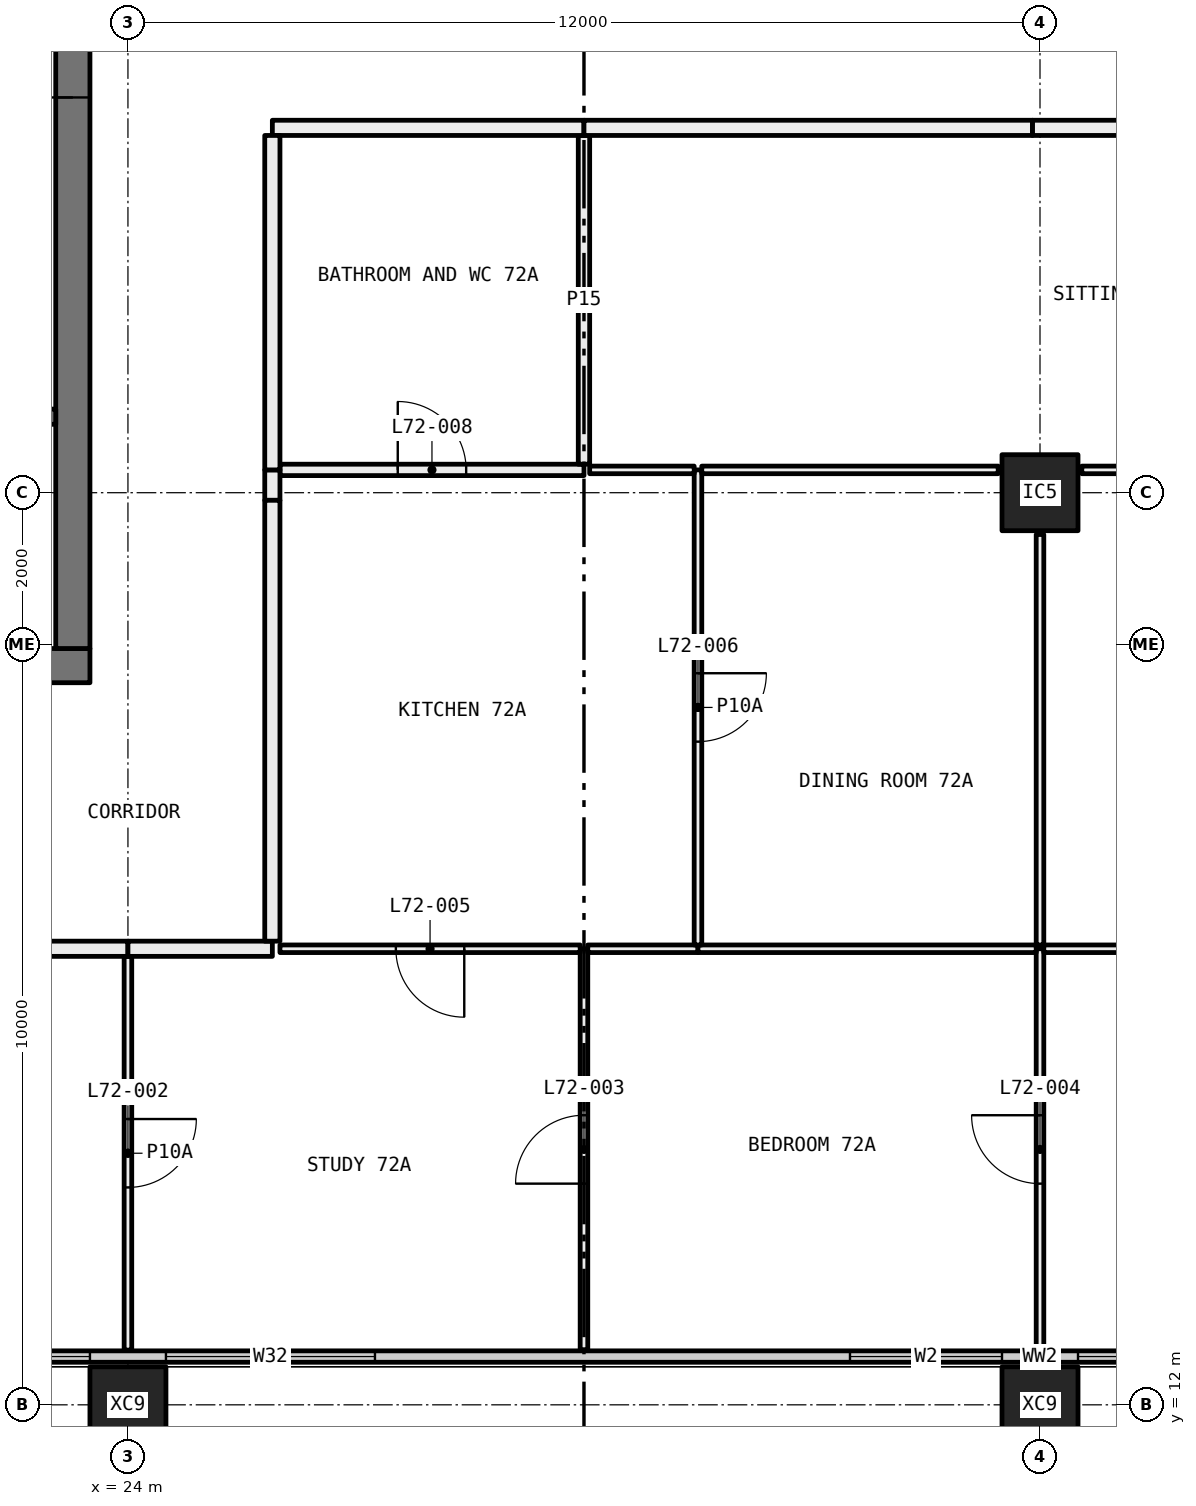
"""IFC4 building model, lengths in metres.
Left out: names, types, materials, properties, quantities, classifications, styles, units other than length and angle.
Written with IfcOpenShell. Run it as: python <this file> out.ifc"""

import sys

from ifc_helpers import new_model, si_unit, direction, frame, frame_2d, origin, origin_2d, place, context, subcontext, project, spatial, rectangle, hollow_rectangle, extrude, element, fill, save


model = new_model("IFC4")
c1 = context("Model", 3, precision=1e-05, world=origin(), true_north=direction((0.0, 1.0)))
c2 = subcontext(c1, "Body", "Model", "MODEL_VIEW")
j1 = project(units=[si_unit("LENGTHUNIT", "METRE"), si_unit("PLANEANGLEUNIT", "RADIAN")], contexts=[c1])
p1 = place(None, origin())
s1 = spatial("IfcSite", under=j1, at=p1, CompositionType="ELEMENT")
p2 = place(p1, origin())
s2 = spatial("IfcBuilding", under=s1, at=p2, CompositionType="ELEMENT")
p3 = place(p2, frame((0.0, 0.0, 266.25)))
s3 = spatial("IfcBuildingStorey", under=s2, at=p3, CompositionType="ELEMENT", Elevation=266.25)
for number, where, z_axis, x_axis in (
    (1, (24.0, 12.0, -0.4), (0.0, 0.0, 1.0), (1.0, 0.0, 0.0)),
    (2, (36.0, 12.0, -0.4), (0.0, 0.0, 1.0), (1.0, 0.0, 0.0)),
):
    element("IfcColumn", number, at=place(p3, frame(where, z_axis=z_axis, x_axis=x_axis)), inside=s3, PredefinedType="COLUMN", context=c2, shape_type="SweptSolid", body=[
        extrude(hollow_rectangle(XDim=1.0, YDim=1.0, WallThickness=0.036, at=origin_2d()), origin(), (0.0, 0.0, 1.0), 3.45),
    ])
p4 = place(p3, frame((36.0, 24.0, 0.0), z_axis=(0.0, 0.0, 1.0), x_axis=(1.0, 0.0, 0.0)))
e3 = element("IfcColumn", 3, at=p4, inside=s3, PredefinedType="COLUMN", context=c2, shape_type="SweptSolid", body=[
    extrude(hollow_rectangle(XDim=1.0, YDim=1.0, WallThickness=0.04, at=origin_2d()), origin(), (0.0, 0.0, 1.0), 3.05),
])
p5 = place(p3, frame((18.56, 12.635, 0.0), z_axis=(0.0, 0.0, 1.0), x_axis=(1.0, 0.0, 0.0)))
e4 = element("IfcWall", 4, at=p5, inside=s3, PredefinedType="ELEMENTEDWALL", context=c2, shape_type="SweptSolid", body=[
    extrude(rectangle(XDim=34.88, YDim=0.15, at=frame_2d((17.44, 0.0))), origin(), (0.0, 0.0, 1.0), 3.05),
])
p6 = place(p5, frame((0.44, 0.0, 0.45)))
e5 = element("IfcOpeningElement", 5, at=p6, cuts=e4, PredefinedType="OPENING", context=c2, shape_type="SweptSolid", body=[
    extrude(rectangle(XDim=4.5, YDim=2.55, at=frame_2d((2.25, 1.275))), frame((0.0, 0.085, 0.0), z_axis=(0.0, -1.0, 0.0), x_axis=(1.0, 0.0, 0.0)), (0.0, 0.0, 1.0), 0.17),
])
p7 = place(p5, frame((5.94, 0.0, 0.45)))
e6 = element("IfcOpeningElement", 6, at=p7, cuts=e4, PredefinedType="OPENING", context=c2, shape_type="SweptSolid", body=[
    extrude(rectangle(XDim=2.75, YDim=2.55, at=frame_2d((1.375, 1.275))), frame((0.0, 0.085, 0.0), z_axis=(0.0, -1.0, 0.0), x_axis=(1.0, 0.0, 0.0)), (0.0, 0.0, 1.0), 0.17),
])
p8 = place(p5, frame((14.94, 0.0, 0.45)))
e7 = element("IfcOpeningElement", 7, at=p8, cuts=e4, PredefinedType="OPENING", context=c2, shape_type="SweptSolid", body=[
    extrude(rectangle(XDim=2.0, YDim=2.55, at=frame_2d((1.0, 1.275))), frame((0.0, 0.085, 0.0), z_axis=(0.0, -1.0, 0.0), x_axis=(1.0, 0.0, 0.0)), (0.0, 0.0, 1.0), 0.17),
])
p9 = place(p5, frame((17.94, 0.0, 0.45)))
e8 = element("IfcOpeningElement", 8, at=p9, cuts=e4, PredefinedType="OPENING", context=c2, shape_type="SweptSolid", body=[
    extrude(rectangle(XDim=2.75, YDim=2.55, at=frame_2d((1.375, 1.275))), frame((0.0, 0.085, 0.0), z_axis=(0.0, -1.0, 0.0), x_axis=(1.0, 0.0, 0.0)), (0.0, 0.0, 1.0), 0.17),
])
p10 = place(p5, frame((26.19, 0.0, 0.45)))
e9 = element("IfcOpeningElement", 9, at=p10, cuts=e4, PredefinedType="OPENING", context=c2, shape_type="SweptSolid", body=[
    extrude(rectangle(XDim=2.75, YDim=2.55, at=frame_2d((1.375, 1.275))), frame((0.0, 0.085, 0.0), z_axis=(0.0, -1.0, 0.0), x_axis=(1.0, 0.0, 0.0)), (0.0, 0.0, 1.0), 0.17),
])
p11 = place(p5, frame((29.94, 0.0, 0.45)))
e10 = element("IfcOpeningElement", 10, at=p11, cuts=e4, PredefinedType="OPENING", context=c2, shape_type="SweptSolid", body=[
    extrude(rectangle(XDim=4.5, YDim=2.55, at=frame_2d((2.25, 1.275))), frame((0.0, 0.085, 0.0), z_axis=(0.0, -1.0, 0.0), x_axis=(1.0, 0.0, 0.0)), (0.0, 0.0, 1.0), 0.17),
])
p12 = place(p3, frame((24.0, 12.72, 0.0), z_axis=(0.0, 0.0, 1.0), x_axis=(0.0, 1.0, 0.0)))
e11 = element("IfcWall", 11, at=p12, inside=s3, PredefinedType="PARTITIONING", context=c2, shape_type="SweptSolid", body=[
    extrude(rectangle(XDim=5.18, YDim=0.1, at=frame_2d((2.59, 0.0))), origin(), (0.0, 0.0, 1.0), 3.05),
])
p13 = place(p12, frame((2.14, 0.0, 0.0)))
e12 = element("IfcOpeningElement", 12, at=p13, cuts=e11, PredefinedType="OPENING", context=c2, shape_type="SweptSolid", body=[
    extrude(rectangle(XDim=0.9, YDim=2.1, at=frame_2d((0.45, 1.05))), frame((0.0, 0.06, 0.0), z_axis=(0.0, -1.0, 0.0), x_axis=(1.0, 0.0, 0.0)), (0.0, 0.0, 1.0), 0.12),
])
p14 = place(p3, frame((24.0, 18.0, 0.0), z_axis=(0.0, 0.0, 1.0), x_axis=(-1.0, 0.0, 0.0)))
e13 = element("IfcWall", 13, at=p14, inside=s3, PredefinedType="PARTITIONING", context=c2, shape_type="SweptSolid", body=[
    extrude(rectangle(XDim=5.28, YDim=0.2, at=frame_2d((2.64, 0.0))), origin(), (0.0, 0.0, 1.0), 3.05),
])
p15 = place(p14, frame((2.14, 0.0, 0.0)))
e14 = element("IfcOpeningElement", 14, at=p15, cuts=e13, PredefinedType="OPENING", context=c2, shape_type="SweptSolid", body=[
    extrude(rectangle(XDim=1.0, YDim=2.1, at=frame_2d((0.5, 1.05))), frame((0.0, 0.11, 0.0), z_axis=(0.0, -1.0, 0.0), x_axis=(1.0, 0.0, 0.0)), (0.0, 0.0, 1.0), 0.22),
])
p16 = place(p3, frame((30.0, 12.72, 0.0), z_axis=(0.0, 0.0, 1.0), x_axis=(0.0, 1.0, 0.0)))
e15 = element("IfcWall", 15, at=p16, inside=s3, PredefinedType="PARTITIONING", context=c2, shape_type="SweptSolid", body=[
    extrude(rectangle(XDim=5.28, YDim=0.1, at=frame_2d((2.64, 0.0))), origin(), (0.0, 0.0, 1.0), 3.05),
])
p17 = place(p16, frame((2.19, 0.0, 0.0)))
e16 = element("IfcOpeningElement", 16, at=p17, cuts=e15, PredefinedType="OPENING", context=c2, shape_type="SweptSolid", body=[
    extrude(rectangle(XDim=0.9, YDim=2.1, at=frame_2d((0.45, 1.05))), frame((0.0, 0.06, 0.0), z_axis=(0.0, -1.0, 0.0), x_axis=(1.0, 0.0, 0.0)), (0.0, 0.0, 1.0), 0.12),
])
p18 = place(p3, frame((29.95, 18.0, 0.0), z_axis=(0.0, 0.0, 1.0), x_axis=(-1.0, 0.0, 0.0)))
e17 = element("IfcWall", 17, at=p18, inside=s3, PredefinedType="PARTITIONING", context=c2, shape_type="SweptSolid", body=[
    extrude(rectangle(XDim=3.95, YDim=0.1, at=frame_2d((1.975, 0.0))), origin(), (0.0, 0.0, 1.0), 3.05),
])
p19 = place(p18, frame((1.525, 0.0, 0.0)))
e18 = element("IfcOpeningElement", 18, at=p19, cuts=e17, PredefinedType="OPENING", context=c2, shape_type="SweptSolid", body=[
    extrude(rectangle(XDim=0.9, YDim=2.1, at=frame_2d((0.45, 1.05))), frame((0.0, 0.06, 0.0), z_axis=(0.0, -1.0, 0.0), x_axis=(1.0, 0.0, 0.0)), (0.0, 0.0, 1.0), 0.12),
])
p20 = place(p3, frame((25.9, 18.0, 0.0), z_axis=(0.0, 0.0, 1.0), x_axis=(-1.0, 0.0, 0.0)))
e19 = element("IfcWall", 19, at=p20, inside=s3, PredefinedType="PARTITIONING", context=c2, shape_type="SweptSolid", body=[
    extrude(rectangle(XDim=1.9, YDim=0.2, at=frame_2d((0.95, 0.0))), origin(), (0.0, 0.0, 1.0), 3.05),
])
p21 = place(p3, frame((36.0, 12.72, 0.0), z_axis=(0.0, 0.0, 1.0), x_axis=(0.0, 1.0, 0.0)))
e20 = element("IfcWall", 20, at=p21, inside=s3, PredefinedType="PARTITIONING", context=c2, shape_type="SweptSolid", body=[
    extrude(rectangle(XDim=5.28, YDim=0.1, at=frame_2d((2.64, 0.0))), origin(), (0.0, 0.0, 1.0), 2.45),
])
p22 = place(p21, frame((2.19, 0.0, 0.0)))
e21 = element("IfcOpeningElement", 21, at=p22, cuts=e20, PredefinedType="OPENING", context=c2, shape_type="SweptSolid", body=[
    extrude(rectangle(XDim=0.9, YDim=2.1, at=frame_2d((0.45, 1.05))), frame((0.0, 0.06, 0.0), z_axis=(0.0, -1.0, 0.0), x_axis=(1.0, 0.0, 0.0)), (0.0, 0.0, 1.0), 0.12),
])
p23 = place(p3, frame((31.5, 18.0, 0.0), z_axis=(0.0, 0.0, 1.0), x_axis=(-1.0, 0.0, 0.0)))
e22 = element("IfcWall", 22, at=p23, inside=s3, PredefinedType="PARTITIONING", context=c2, shape_type="SweptSolid", body=[
    extrude(rectangle(XDim=1.45, YDim=0.1, at=frame_2d((0.725, 0.0))), origin(), (0.0, 0.0, 1.0), 3.05),
])
p24 = place(p3, frame((35.95, 18.0, 0.0), z_axis=(0.0, 0.0, 1.0), x_axis=(-1.0, 0.0, 0.0)))
e23 = element("IfcWall", 23, at=p24, inside=s3, PredefinedType="PARTITIONING", context=c2, shape_type="SweptSolid", body=[
    extrude(rectangle(XDim=4.45, YDim=0.1, at=frame_2d((2.225, 0.0))), origin(), (0.0, 0.0, 1.0), 2.45),
])
p25 = place(p3, frame((41.9, 18.0, 0.0), z_axis=(0.0, 0.0, 1.0), x_axis=(-1.0, 0.0, 0.0)))
e24 = element("IfcWall", 24, at=p25, inside=s3, PredefinedType="PARTITIONING", context=c2, shape_type="SweptSolid", body=[
    extrude(rectangle(XDim=5.85, YDim=0.1, at=frame_2d((2.925, 0.0))), origin(), (0.0, 0.0, 1.0), 2.45),
])
p26 = place(p25, frame((2.475, 0.0, 0.0)))
e25 = element("IfcOpeningElement", 25, at=p26, cuts=e24, PredefinedType="OPENING", context=c2, shape_type="SweptSolid", body=[
    extrude(rectangle(XDim=0.9, YDim=2.1, at=frame_2d((0.45, 1.05))), frame((0.0, 0.06, 0.0), z_axis=(0.0, -1.0, 0.0), x_axis=(1.0, 0.0, 0.0)), (0.0, 0.0, 1.0), 0.12),
])
p27 = place(p3, frame((31.5, 18.05, 0.0), z_axis=(0.0, 0.0, 1.0), x_axis=(0.0, 1.0, 0.0)))
e26 = element("IfcWall", 26, at=p27, inside=s3, PredefinedType="PARTITIONING", context=c2, shape_type="SweptSolid", body=[
    extrude(rectangle(XDim=6.25, YDim=0.1, at=frame_2d((3.125, 0.0))), origin(), (0.0, 0.0, 1.0), 2.45),
])
p28 = place(p27, frame((2.675, 0.0, 0.0)))
e27 = element("IfcOpeningElement", 27, at=p28, cuts=e26, PredefinedType="OPENING", context=c2, shape_type="SweptSolid", body=[
    extrude(rectangle(XDim=0.9, YDim=2.1, at=frame_2d((0.45, 1.05))), frame((0.0, 0.06, 0.0), z_axis=(0.0, -1.0, 0.0), x_axis=(1.0, 0.0, 0.0)), (0.0, 0.0, 1.0), 0.12),
])
p29 = place(p3, frame((30.0, 24.3, 0.0), z_axis=(0.0, 0.0, 1.0), x_axis=(-1.0, 0.0, 0.0)))
e28 = element("IfcWall", 28, at=p29, inside=s3, PredefinedType="PARTITIONING", context=c2, shape_type="SweptSolid", body=[
    extrude(rectangle(XDim=4.0, YDim=0.15, at=frame_2d((2.0, 0.0))), origin(), (0.0, 0.0, 1.0), 3.05),
])
p30 = place(p29, frame((1.55, 0.0, 0.0)))
e29 = element("IfcOpeningElement", 29, at=p30, cuts=e28, PredefinedType="OPENING", context=c2, shape_type="SweptSolid", body=[
    extrude(rectangle(XDim=0.9, YDim=2.1, at=frame_2d((0.45, 1.05))), frame((0.0, 0.085, 0.0), z_axis=(0.0, -1.0, 0.0), x_axis=(1.0, 0.0, 0.0)), (0.0, 0.0, 1.0), 0.17),
])
p31 = place(p3, frame((31.45, 24.3, 0.0), z_axis=(0.0, 0.0, 1.0), x_axis=(-1.0, 0.0, 0.0)))
e30 = element("IfcWall", 30, at=p31, inside=s3, PredefinedType="PARTITIONING", context=c2, shape_type="SweptSolid", body=[
    extrude(rectangle(XDim=1.375, YDim=0.1, at=frame_2d((0.688, 0.0))), origin(), (0.0, 0.0, 1.0), 3.05),
])
p32 = place(p3, frame((25.9, 24.3, 0.0), z_axis=(0.0, 0.0, 1.0), x_axis=(0.0, -1.0, 0.0)))
e31 = element("IfcWall", 31, at=p32, inside=s3, PredefinedType="PARTITIONING", context=c2, shape_type="SweptSolid", body=[
    extrude(rectangle(XDim=0.4, YDim=0.2, at=frame_2d((0.2, 0.0))), origin(), (0.0, 0.0, 1.0), 2.45),
])
p33 = place(p3, frame((25.9, 23.9, 0.0), z_axis=(0.0, 0.0, 1.0), x_axis=(0.0, -1.0, 0.0)))
e32 = element("IfcWall", 32, at=p33, inside=s3, PredefinedType="PARTITIONING", context=c2, shape_type="SweptSolid", body=[
    extrude(rectangle(XDim=5.8, YDim=0.2, at=frame_2d((2.9, 0.0))), origin(), (0.0, 0.0, 1.0), 3.05),
])
p34 = place(p3, frame((36.0, 18.05, 0.0), z_axis=(0.0, 0.0, 1.0), x_axis=(0.0, 1.0, 0.0)))
e33 = element("IfcWall", 33, at=p34, inside=s3, PredefinedType="PARTITIONING", context=c2, shape_type="SweptSolid", body=[
    extrude(rectangle(XDim=5.4, YDim=0.1, at=frame_2d((2.7, 0.0))), origin(), (0.0, 0.0, 1.0), 2.45),
])
p35 = place(p3, frame((35.45, 24.3, 0.0), z_axis=(0.0, 0.0, 1.0), x_axis=(-1.0, 0.0, 0.0)))
e34 = element("IfcWall", 34, at=p35, inside=s3, PredefinedType="PARTITIONING", context=c2, shape_type="SweptSolid", body=[
    extrude(rectangle(XDim=3.9, YDim=0.1, at=frame_2d((1.95, 0.0))), origin(), (0.0, 0.0, 1.0), 3.05),
])
p36 = place(p3, frame((41.9, 24.3, 0.0), z_axis=(0.0, 0.0, 1.0), x_axis=(-1.0, 0.0, 0.0)))
e35 = element("IfcWall", 35, at=p36, inside=s3, PredefinedType="PARTITIONING", context=c2, shape_type="SweptSolid", body=[
    extrude(rectangle(XDim=5.35, YDim=0.1, at=frame_2d((2.675, 0.0))), origin(), (0.0, 0.0, 1.0), 3.05),
])
p37 = place(p36, frame((2.225, 0.0, 0.0)))
e36 = element("IfcOpeningElement", 36, at=p37, cuts=e35, PredefinedType="OPENING", context=c2, shape_type="SweptSolid", body=[
    extrude(rectangle(XDim=0.9, YDim=2.1, at=frame_2d((0.45, 1.05))), frame((0.0, 0.06, 0.0), z_axis=(0.0, -1.0, 0.0), x_axis=(1.0, 0.0, 0.0)), (0.0, 0.0, 1.0), 0.12),
])
p38 = place(p3, frame((30.0, 24.375, 0.0), z_axis=(0.0, 0.0, 1.0), x_axis=(0.0, 1.0, 0.0)))
e37 = element("IfcWall", 37, at=p38, inside=s3, PredefinedType="PARTITIONING", context=c2, shape_type="SweptSolid", body=[
    extrude(rectangle(XDim=4.325, YDim=0.15, at=frame_2d((2.163, 0.0))), origin(), (0.0, 0.0, 1.0), 3.05),
])
p39 = place(p3, frame((30.0, 28.8, 0.0), z_axis=(0.0, 0.0, 1.0), x_axis=(-1.0, 0.0, 0.0)))
e38 = element("IfcWall", 38, at=p39, inside=s3, PredefinedType="PARTITIONING", context=c2, shape_type="SweptSolid", body=[
    extrude(rectangle(XDim=4.1, YDim=0.2, at=frame_2d((2.05, 0.0))), origin(), (0.0, 0.0, 1.0), 3.05),
])
p40 = place(p3, frame((25.9, 28.7, 0.0), z_axis=(0.0, 0.0, 1.0), x_axis=(0.0, -1.0, 0.0)))
e39 = element("IfcWall", 39, at=p40, inside=s3, PredefinedType="PARTITIONING", context=c2, shape_type="SweptSolid", body=[
    extrude(rectangle(XDim=4.4, YDim=0.2, at=frame_2d((2.2, 0.0))), origin(), (0.0, 0.0, 1.0), 3.05),
])
p41 = place(p3, frame((41.9, 28.8, 0.0), z_axis=(0.0, 0.0, 1.0), x_axis=(-1.0, 0.0, 0.0)))
e40 = element("IfcWall", 40, at=p41, inside=s3, PredefinedType="PARTITIONING", context=c2, shape_type="SweptSolid", body=[
    extrude(rectangle(XDim=6.0, YDim=0.2, at=frame_2d((3.0, 0.0))), origin(), (0.0, 0.0, 1.0), 2.45),
])
p42 = place(p3, frame((35.9, 28.8, 0.0), z_axis=(0.0, 0.0, 1.0), x_axis=(-1.0, 0.0, 0.0)))
e41 = element("IfcWall", 41, at=p42, inside=s3, PredefinedType="PARTITIONING", context=c2, shape_type="SweptSolid", body=[
    extrude(rectangle(XDim=5.9, YDim=0.2, at=frame_2d((2.95, 0.0))), origin(), (0.0, 0.0, 1.0), 3.05),
])
p43 = place(p3, frame((12.5, 21.725, 0.0), z_axis=(0.0, 0.0, 1.0), x_axis=(1.0, 0.0, 0.0)))
e42 = element("IfcWall", 42, at=p43, inside=s3, PredefinedType="SHEAR", context=c2, shape_type="SweptSolid", body=[
    extrude(rectangle(XDim=11.0, YDim=0.45, at=frame_2d((5.5, 0.0))), origin(), (0.0, 0.0, 1.0), 3.05),
])
p44 = place(p43, frame((1.125, 0.0, 0.0)))
e43 = element("IfcOpeningElement", 43, at=p44, cuts=e42, PredefinedType="OPENING", context=c2, shape_type="SweptSolid", body=[
    extrude(rectangle(XDim=1.0, YDim=2.1, at=frame_2d((0.5, 1.05))), frame((0.0, 0.235, 0.0), z_axis=(0.0, -1.0, 0.0), x_axis=(1.0, 0.0, 0.0)), (0.0, 0.0, 1.0), 0.47),
])
p45 = place(p3, frame((23.275, 21.95, 0.0), z_axis=(0.0, 0.0, 1.0), x_axis=(0.0, 1.0, 0.0)))
e44 = element("IfcWall", 44, at=p45, inside=s3, PredefinedType="SHEAR", context=c2, shape_type="SweptSolid", body=[
    extrude(rectangle(XDim=16.1, YDim=0.45, at=frame_2d((8.05, 0.0))), origin(), (0.0, 0.0, 1.0), 3.05),
])
p46 = place(p45, frame((7.25, 0.0, 0.0)))
e45 = element("IfcOpeningElement", 45, at=p46, cuts=e44, PredefinedType="OPENING", context=c2, shape_type="SweptSolid", body=[
    extrude(rectangle(XDim=1.6, YDim=2.1, at=frame_2d((0.8, 1.05))), frame((0.0, 0.235, 0.0), z_axis=(0.0, -1.0, 0.0), x_axis=(1.0, 0.0, 0.0)), (0.0, 0.0, 1.0), 0.47),
])
p47 = place(p3, frame((15.5, 25.0, 0.0), z_axis=(0.0, 0.0, 1.0), x_axis=(1.0, 0.0, 0.0)))
e46 = element("IfcWall", 46, at=p47, inside=s3, PredefinedType="SOLIDWALL", context=c2, shape_type="SweptSolid", body=[
    extrude(rectangle(XDim=7.55, YDim=0.2, at=frame_2d((3.775, 0.0))), origin(), (0.0, 0.0, 1.0), 3.05),
])
p48 = place(p6, origin())
e47 = element("IfcWindow", 47, at=p48, inside=s3, PartitioningType="SINGLE_PANEL", PredefinedType="WINDOW", context=c2, shape_type="SweptSolid", body=[
    extrude(rectangle(XDim=4.5, YDim=2.55, at=frame_2d((2.25, 1.275))), frame((0.0, 0.03, 0.0), z_axis=(0.0, -1.0, 0.0), x_axis=(1.0, 0.0, 0.0)), (0.0, 0.0, 1.0), 0.06),
])
fill(e5, e47)
p49 = place(p7, origin())
e48 = element("IfcWindow", 48, at=p49, inside=s3, PartitioningType="SINGLE_PANEL", PredefinedType="WINDOW", context=c2, shape_type="SweptSolid", body=[
    extrude(rectangle(XDim=2.75, YDim=2.55, at=frame_2d((1.375, 1.275))), frame((0.0, 0.03, 0.0), z_axis=(0.0, -1.0, 0.0), x_axis=(1.0, 0.0, 0.0)), (0.0, 0.0, 1.0), 0.06),
])
fill(e6, e48)
p50 = place(p8, origin())
e49 = element("IfcWindow", 49, at=p50, inside=s3, PartitioningType="SINGLE_PANEL", PredefinedType="WINDOW", context=c2, shape_type="SweptSolid", body=[
    extrude(rectangle(XDim=2.0, YDim=2.55, at=frame_2d((1.0, 1.275))), frame((0.0, 0.03, 0.0), z_axis=(0.0, -1.0, 0.0), x_axis=(1.0, 0.0, 0.0)), (0.0, 0.0, 1.0), 0.06),
])
fill(e7, e49)
p51 = place(p9, origin())
e50 = element("IfcWindow", 50, at=p51, inside=s3, PartitioningType="SINGLE_PANEL", PredefinedType="WINDOW", context=c2, shape_type="SweptSolid", body=[
    extrude(rectangle(XDim=2.75, YDim=2.55, at=frame_2d((1.375, 1.275))), frame((0.0, 0.03, 0.0), z_axis=(0.0, -1.0, 0.0), x_axis=(1.0, 0.0, 0.0)), (0.0, 0.0, 1.0), 0.06),
])
fill(e8, e50)
p52 = place(p13, frame((0.9, 0.0, 0.0), x_axis=(-1.0, 0.0, 0.0)))
e51 = element("IfcDoor", 51, at=p52, inside=s3, OperationType="SINGLE_SWING_RIGHT", PredefinedType="DOOR", context=c2, shape_type="SweptSolid", body=[
    extrude(rectangle(XDim=0.9, YDim=2.1, at=frame_2d((0.45, 1.05))), frame((0.0, 0.025, 0.0), z_axis=(0.0, -1.0, 0.0), x_axis=(1.0, 0.0, 0.0)), (0.0, 0.0, 1.0), 0.05),
])
fill(e12, e51)
p53 = place(p17, origin())
e52 = element("IfcDoor", 52, at=p53, inside=s3, OperationType="SINGLE_SWING_RIGHT", PredefinedType="DOOR", context=c2, shape_type="SweptSolid", body=[
    extrude(rectangle(XDim=0.9, YDim=2.1, at=frame_2d((0.45, 1.05))), frame((0.0, 0.025, 0.0), z_axis=(0.0, -1.0, 0.0), x_axis=(1.0, 0.0, 0.0)), (0.0, 0.0, 1.0), 0.05),
])
fill(e16, e52)
p54 = place(p22, origin())
e53 = element("IfcDoor", 53, at=p54, inside=s3, OperationType="SINGLE_SWING_LEFT", PredefinedType="DOOR", context=c2, shape_type="SweptSolid", body=[
    extrude(rectangle(XDim=0.9, YDim=2.1, at=frame_2d((0.45, 1.05))), frame((0.0, 0.025, 0.0), z_axis=(0.0, -1.0, 0.0), x_axis=(1.0, 0.0, 0.0)), (0.0, 0.0, 1.0), 0.05),
])
fill(e21, e53)
p55 = place(p19, origin())
e54 = element("IfcDoor", 54, at=p55, inside=s3, OperationType="SINGLE_SWING_RIGHT", PredefinedType="DOOR", context=c2, shape_type="SweptSolid", body=[
    extrude(rectangle(XDim=0.9, YDim=2.1, at=frame_2d((0.45, 1.05))), frame((0.0, 0.025, 0.0), z_axis=(0.0, -1.0, 0.0), x_axis=(1.0, 0.0, 0.0)), (0.0, 0.0, 1.0), 0.05),
])
fill(e18, e54)
p56 = place(p28, frame((0.9, 0.0, 0.0), x_axis=(-1.0, 0.0, 0.0)))
e55 = element("IfcDoor", 55, at=p56, inside=s3, OperationType="SINGLE_SWING_RIGHT", PredefinedType="DOOR", context=c2, shape_type="SweptSolid", body=[
    extrude(rectangle(XDim=0.9, YDim=2.1, at=frame_2d((0.45, 1.05))), frame((0.0, 0.025, 0.0), z_axis=(0.0, -1.0, 0.0), x_axis=(1.0, 0.0, 0.0)), (0.0, 0.0, 1.0), 0.05),
])
fill(e27, e55)
p57 = place(p30, frame((0.9, 0.0, 0.0), x_axis=(-1.0, 0.0, 0.0)))
e56 = element("IfcDoor", 56, at=p57, inside=s3, OperationType="SINGLE_SWING_RIGHT", PredefinedType="DOOR", context=c2, shape_type="SweptSolid", body=[
    extrude(rectangle(XDim=0.9, YDim=2.1, at=frame_2d((0.45, 1.05))), frame((0.0, 0.025, 0.0), z_axis=(0.0, -1.0, 0.0), x_axis=(1.0, 0.0, 0.0)), (0.0, 0.0, 1.0), 0.05),
])
fill(e29, e56)
p58 = place(p46, origin())
e57 = element("IfcDoor", 57, at=p58, inside=s3, OperationType="DOUBLE_DOOR_SINGLE_SWING", PredefinedType="DOOR", context=c2, shape_type="SweptSolid", body=[
    extrude(rectangle(XDim=1.6, YDim=2.1, at=frame_2d((0.8, 1.05))), frame((0.0, 0.025, 0.0), z_axis=(0.0, -1.0, 0.0), x_axis=(1.0, 0.0, 0.0)), (0.0, 0.0, 1.0), 0.05),
])
fill(e45, e57)
save(model, sys.argv[1])
